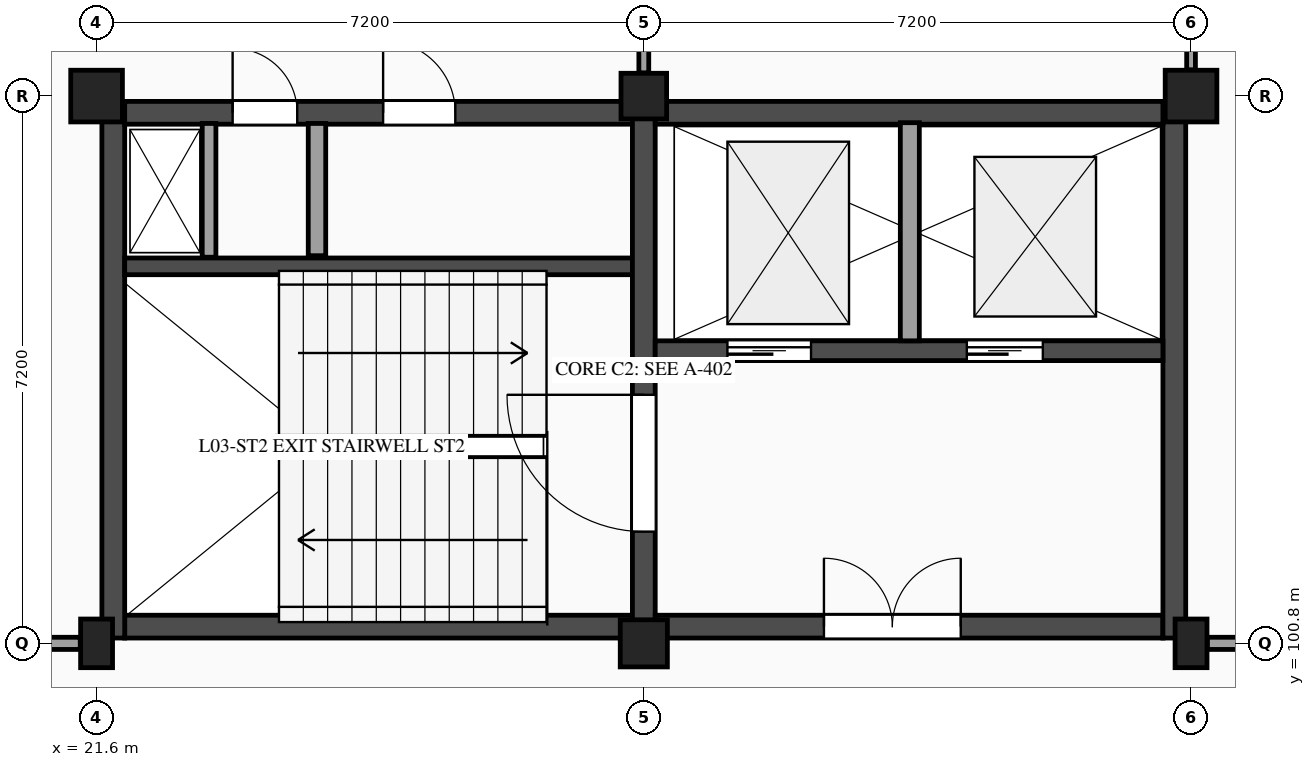
"""IFC4 building model, lengths in metres.
Left out: names, types, materials, properties, quantities, classifications, styles, units other than length and angle.
Written with IfcOpenShell. Run it as: python <this file> out.ifc"""

import sys

from ifc_helpers import new_model, si_unit, direction, frame, frame_2d, origin, origin_2d, place, context, subcontext, project, spatial, rectangle, extrude, element, fill, save


model = new_model("IFC4")
c1 = context("Model", 3, precision=1e-05, world=origin(), true_north=direction((0.0, 1.0)))
c2 = subcontext(c1, "Body", "Model", "MODEL_VIEW")
j1 = project(units=[si_unit("LENGTHUNIT", "METRE"), si_unit("PLANEANGLEUNIT", "RADIAN")], contexts=[c1])
p1 = place(None, origin())
s1 = spatial("IfcSite", under=j1, at=p1, CompositionType="ELEMENT")
p2 = place(p1, origin())
s2 = spatial("IfcBuilding", under=s1, at=p2, CompositionType="ELEMENT")
p3 = place(p2, frame((0.0, 0.0, 14.4)))
s3 = spatial("IfcBuildingStorey", under=s2, at=p3, CompositionType="ELEMENT", Elevation=14.4)
p4 = place(p3, frame((21.6, 100.8, 0.0), z_axis=(0.0, 0.0, 1.0), x_axis=(1.0, 0.0, 0.0)))
e1 = element("IfcColumn", 1, at=p4, inside=s3, PredefinedType="PILASTER", context=c2, shape_type="SweptSolid", body=[
    extrude(rectangle(XDim=0.42, YDim=0.64, at=origin_2d()), origin(), (0.0, 0.0, 1.0), 4.2),
])
p5 = place(p3, frame((21.6, 108.0, 0.0), z_axis=(0.0, 0.0, 1.0), x_axis=(1.0, 0.0, 0.0)))
e2 = element("IfcColumn", 2, at=p5, inside=s3, PredefinedType="COLUMN", context=c2, shape_type="SweptSolid", body=[
    extrude(rectangle(XDim=0.68, YDim=0.68, at=origin_2d()), origin(), (0.0, 0.0, 1.0), 4.2),
])
p6 = place(p3, frame((28.8, 100.8, 0.0), z_axis=(0.0, 0.0, 1.0), x_axis=(1.0, 0.0, 0.0)))
e3 = element("IfcColumn", 3, at=p6, inside=s3, PredefinedType="COLUMN", context=c2, shape_type="SweptSolid", body=[
    extrude(rectangle(XDim=0.62, YDim=0.62, at=origin_2d()), origin(), (0.0, 0.0, 1.0), 4.2),
])
p7 = place(p3, frame((28.8, 108.0, 0.0), z_axis=(0.0, 0.0, 1.0), x_axis=(1.0, 0.0, 0.0)))
e4 = element("IfcColumn", 4, at=p7, inside=s3, PredefinedType="COLUMN", context=c2, shape_type="SweptSolid", body=[
    extrude(rectangle(XDim=0.6, YDim=0.6, at=origin_2d()), origin(), (0.0, 0.0, 1.0), 4.2),
])
p8 = place(p3, frame((36.0, 100.8, 0.0), z_axis=(0.0, 0.0, 1.0), x_axis=(1.0, 0.0, 0.0)))
e5 = element("IfcColumn", 5, at=p8, inside=s3, PredefinedType="PILASTER", context=c2, shape_type="SweptSolid", body=[
    extrude(rectangle(XDim=0.42, YDim=0.64, at=origin_2d()), origin(), (0.0, 0.0, 1.0), 4.2),
])
p9 = place(p3, frame((36.0, 108.0, 0.0), z_axis=(0.0, 0.0, 1.0), x_axis=(1.0, 0.0, 0.0)))
e6 = element("IfcColumn", 6, at=p9, inside=s3, PredefinedType="COLUMN", context=c2, shape_type="SweptSolid", body=[
    extrude(rectangle(XDim=0.68, YDim=0.68, at=origin_2d()), origin(), (0.0, 0.0, 1.0), 4.2),
])
p10 = place(p3, frame((21.97, 101.02, 0.0), z_axis=(0.0, 0.0, 1.0), x_axis=(1.0, 0.0, 0.0)))
e7 = element("IfcWall", 7, at=p10, inside=s3, PredefinedType="SHEAR", context=c2, shape_type="SweptSolid", body=[
    extrude(rectangle(XDim=6.68, YDim=0.3, at=frame_2d((3.34, 0.0))), origin(), (0.0, 0.0, 1.0), 3.94),
])
p11 = place(p3, frame((21.82, 107.93, 0.0), z_axis=(0.0, 0.0, 1.0), x_axis=(0.0, -1.0, 0.0)))
e8 = element("IfcWall", 8, at=p11, inside=s3, PredefinedType="SHEAR", context=c2, shape_type="SweptSolid", body=[
    extrude(rectangle(XDim=7.06, YDim=0.3, at=frame_2d((3.53, 0.0))), origin(), (0.0, 0.0, 1.0), 3.94),
])
p12 = place(p3, frame((21.97, 107.78, 0.0), z_axis=(0.0, 0.0, 1.0), x_axis=(1.0, 0.0, 0.0)))
e9 = element("IfcWall", 9, at=p12, inside=s3, PredefinedType="SHEAR", context=c2, shape_type="SweptSolid", body=[
    extrude(rectangle(XDim=6.68, YDim=0.3, at=frame_2d((3.34, 0.0))), origin(), (0.0, 0.0, 1.0), 3.94),
])
p13 = place(p12, frame((1.42, 0.0, 0.0)))
e10 = element("IfcOpeningElement", 10, at=p13, cuts=e9, PredefinedType="OPENING", context=c2, shape_type="SweptSolid", body=[
    extrude(rectangle(XDim=0.85, YDim=2.1, at=frame_2d((0.425, 1.05))), frame((0.0, 0.16, 0.0), z_axis=(0.0, -1.0, 0.0), x_axis=(1.0, 0.0, 0.0)), (0.0, 0.0, 1.0), 0.32),
])
p14 = place(p12, frame((3.4, 0.0, 0.0)))
e11 = element("IfcOpeningElement", 11, at=p14, cuts=e9, PredefinedType="OPENING", context=c2, shape_type="SweptSolid", body=[
    extrude(rectangle(XDim=0.95, YDim=2.15, at=frame_2d((0.475, 1.075))), frame((0.0, 0.16, 0.0), z_axis=(0.0, -1.0, 0.0), x_axis=(1.0, 0.0, 0.0)), (0.0, 0.0, 1.0), 0.32),
])
p15 = place(p3, frame((21.97, 105.76, 0.0), z_axis=(0.0, 0.0, 1.0), x_axis=(1.0, 0.0, 0.0)))
e12 = element("IfcWall", 12, at=p15, inside=s3, PredefinedType="SHEAR", context=c2, shape_type="SweptSolid", body=[
    extrude(rectangle(XDim=6.68, YDim=0.22, at=frame_2d((3.34, 0.0))), origin(), (0.0, 0.0, 1.0), 3.94),
])
p16 = place(p3, frame((24.5, 105.9, 0.0), z_axis=(0.0, 0.0, 1.0), x_axis=(0.0, 1.0, 0.0)))
e13 = element("IfcWall", 13, at=p16, inside=s3, PredefinedType="PARTITIONING", context=c2, shape_type="SweptSolid", body=[
    extrude(rectangle(XDim=1.74, YDim=0.23, at=frame_2d((0.87, 0.0))), origin(), (0.0, 0.0, 1.0), 3.94),
])
p17 = place(p3, frame((23.08, 105.88, 0.0), z_axis=(0.0, 0.0, 1.0), x_axis=(0.0, 1.0, 0.0)))
e14 = element("IfcWall", 14, at=p17, inside=s3, PredefinedType="PARTITIONING", context=c2, shape_type="SweptSolid", body=[
    extrude(rectangle(XDim=1.76, YDim=0.18, at=frame_2d((0.88, 0.0))), origin(), (0.0, 0.0, 1.0), 3.94),
])
p18 = place(p3, frame((28.8, 100.87, 0.0), z_axis=(0.0, 0.0, 1.0), x_axis=(0.0, 1.0, 0.0)))
e15 = element("IfcWall", 15, at=p18, inside=s3, PredefinedType="SHEAR", context=c2, shape_type="SweptSolid", body=[
    extrude(rectangle(XDim=7.06, YDim=0.3, at=frame_2d((3.53, 0.0))), origin(), (0.0, 0.0, 1.0), 3.94),
])
p19 = place(p18, frame((1.4, 0.0, 0.0)))
e16 = element("IfcOpeningElement", 16, at=p19, cuts=e15, PredefinedType="OPENING", context=c2, shape_type="SweptSolid", body=[
    extrude(rectangle(XDim=1.8, YDim=2.2, at=frame_2d((0.9, 1.1))), frame((0.0, 0.16, 0.0), z_axis=(0.0, -1.0, 0.0), x_axis=(1.0, 0.0, 0.0)), (0.0, 0.0, 1.0), 0.32),
])
p20 = place(p3, frame((28.95, 101.02, 0.0), z_axis=(0.0, 0.0, 1.0), x_axis=(1.0, 0.0, 0.0)))
e17 = element("IfcWall", 17, at=p20, inside=s3, PredefinedType="SHEAR", context=c2, shape_type="SweptSolid", body=[
    extrude(rectangle(XDim=6.68, YDim=0.3, at=frame_2d((3.34, 0.0))), origin(), (0.0, 0.0, 1.0), 3.94),
])
p21 = place(p20, frame((2.22, 0.0, 0.0)))
e18 = element("IfcOpeningElement", 18, at=p21, cuts=e17, PredefinedType="OPENING", context=c2, shape_type="SweptSolid", body=[
    extrude(rectangle(XDim=1.8, YDim=2.2, at=frame_2d((0.9, 1.1))), frame((0.0, 0.16, 0.0), z_axis=(0.0, -1.0, 0.0), x_axis=(1.0, 0.0, 0.0)), (0.0, 0.0, 1.0), 0.32),
])
p22 = place(p3, frame((35.78, 100.87, 0.0), z_axis=(0.0, 0.0, 1.0), x_axis=(0.0, 1.0, 0.0)))
e19 = element("IfcWall", 19, at=p22, inside=s3, PredefinedType="SHEAR", context=c2, shape_type="SweptSolid", body=[
    extrude(rectangle(XDim=7.06, YDim=0.3, at=frame_2d((3.53, 0.0))), origin(), (0.0, 0.0, 1.0), 3.94),
])
p23 = place(p3, frame((28.95, 107.78, 0.0), z_axis=(0.0, 0.0, 1.0), x_axis=(1.0, 0.0, 0.0)))
e20 = element("IfcWall", 20, at=p23, inside=s3, PredefinedType="SHEAR", context=c2, shape_type="SweptSolid", body=[
    extrude(rectangle(XDim=6.68, YDim=0.3, at=frame_2d((3.34, 0.0))), origin(), (0.0, 0.0, 1.0), 3.94),
])
p24 = place(p3, frame((28.95, 104.65, 0.0), z_axis=(0.0, 0.0, 1.0), x_axis=(1.0, 0.0, 0.0)))
e21 = element("IfcWall", 21, at=p24, inside=s3, PredefinedType="SHEAR", context=c2, shape_type="SweptSolid", body=[
    extrude(rectangle(XDim=6.68, YDim=0.26, at=frame_2d((3.34, 0.0))), origin(), (0.0, 0.0, 1.0), 3.94),
])
p25 = place(p24, frame((0.95, 0.0, 0.0)))
e22 = element("IfcOpeningElement", 22, at=p25, cuts=e21, PredefinedType="OPENING", context=c2, shape_type="SweptSolid", body=[
    extrude(rectangle(XDim=1.1, YDim=2.2, at=frame_2d((0.55, 1.1))), frame((0.0, 0.14, 0.0), z_axis=(0.0, -1.0, 0.0), x_axis=(1.0, 0.0, 0.0)), (0.0, 0.0, 1.0), 0.28),
])
p26 = place(p24, frame((4.1, 0.0, 0.0)))
e23 = element("IfcOpeningElement", 23, at=p26, cuts=e21, PredefinedType="OPENING", context=c2, shape_type="SweptSolid", body=[
    extrude(rectangle(XDim=1.0, YDim=2.15, at=frame_2d((0.5, 1.075))), frame((0.0, 0.14, 0.0), z_axis=(0.0, -1.0, 0.0), x_axis=(1.0, 0.0, 0.0)), (0.0, 0.0, 1.0), 0.28),
])
p27 = place(p3, frame((32.3, 104.78, 0.0), z_axis=(0.0, 0.0, 1.0), x_axis=(0.0, 1.0, 0.0)))
e24 = element("IfcWall", 24, at=p27, inside=s3, PredefinedType="PARTITIONING", context=c2, shape_type="SweptSolid", body=[
    extrude(rectangle(XDim=2.87, YDim=0.25, at=frame_2d((1.435, 0.0))), origin(), (0.0, 0.0, 1.0), 3.94),
])
p28 = place(p3, frame((14.715, 100.8, 0.0), z_axis=(0.0, 0.0, 1.0), x_axis=(1.0, 0.0, 0.0)))
e25 = element("IfcWall", 25, at=p28, inside=s3, PredefinedType="PARTITIONING", context=c2, shape_type="SweptSolid", body=[
    extrude(rectangle(XDim=6.67, YDim=0.16, at=frame_2d((3.335, 0.0))), origin(), (0.0, 0.0, 1.0), 3.24),
])
p29 = place(p3, frame((28.8, 108.305, 0.0), z_axis=(0.0, 0.0, 1.0), x_axis=(0.0, 1.0, 0.0)))
e26 = element("IfcWall", 26, at=p29, inside=s3, PredefinedType="PARTITIONING", context=c2, shape_type="SweptSolid", body=[
    extrude(rectangle(XDim=6.515, YDim=0.13, at=frame_2d((3.258, 0.0))), origin(), (0.0, 0.0, 1.0), 3.245),
])
p30 = place(p3, frame((36.0, 108.345, 0.0), z_axis=(0.0, 0.0, 1.0), x_axis=(0.0, 1.0, 0.0)))
e27 = element("IfcWall", 27, at=p30, inside=s3, PredefinedType="PARTITIONING", context=c2, shape_type="SweptSolid", body=[
    extrude(rectangle(XDim=6.525, YDim=0.115, at=frame_2d((3.263, 0.0))), origin(), (0.0, 0.0, 1.0), 3.245),
])
p31 = place(p3, frame((36.215, 100.8, 0.0), z_axis=(0.0, 0.0, 1.0), x_axis=(1.0, 0.0, 0.0)))
e28 = element("IfcWall", 28, at=p31, inside=s3, PredefinedType="PARTITIONING", context=c2, shape_type="SweptSolid", body=[
    extrude(rectangle(XDim=6.67, YDim=0.16, at=frame_2d((3.335, 0.0))), origin(), (0.0, 0.0, 1.0), 3.3),
])
p32 = place(p31, frame((2.535, 0.0, 0.0)))
e29 = element("IfcOpeningElement", 29, at=p32, cuts=e28, PredefinedType="OPENING", context=c2, shape_type="SweptSolid", body=[
    extrude(rectangle(XDim=1.6, YDim=2.2, at=frame_2d((0.8, 1.1))), frame((0.0, 0.09, 0.0), z_axis=(0.0, -1.0, 0.0), x_axis=(1.0, 0.0, 0.0)), (0.0, 0.0, 1.0), 0.18),
])
p33 = place(p13, origin())
e30 = element("IfcDoor", 30, at=p33, inside=s3, OperationType="SINGLE_SWING_LEFT", PredefinedType="DOOR", context=c2, shape_type="SweptSolid", body=[
    extrude(rectangle(XDim=0.85, YDim=2.1, at=frame_2d((0.425, 1.05))), frame((0.0, 0.025, 0.0), z_axis=(0.0, -1.0, 0.0), x_axis=(1.0, 0.0, 0.0)), (0.0, 0.0, 1.0), 0.05),
])
fill(e10, e30)
p34 = place(p19, origin())
e31 = element("IfcDoor", 31, at=p34, inside=s3, OperationType="SINGLE_SWING_RIGHT", PredefinedType="DOOR", context=c2, shape_type="SweptSolid", body=[
    extrude(rectangle(XDim=1.8, YDim=2.2, at=frame_2d((0.9, 1.1))), frame((0.0, 0.025, 0.0), z_axis=(0.0, -1.0, 0.0), x_axis=(1.0, 0.0, 0.0)), (0.0, 0.0, 1.0), 0.05),
])
fill(e16, e31)
p35 = place(p14, origin())
e32 = element("IfcDoor", 32, at=p35, inside=s3, OperationType="SINGLE_SWING_LEFT", PredefinedType="DOOR", context=c2, shape_type="SweptSolid", body=[
    extrude(rectangle(XDim=0.95, YDim=2.15, at=frame_2d((0.475, 1.075))), frame((0.0, 0.025, 0.0), z_axis=(0.0, -1.0, 0.0), x_axis=(1.0, 0.0, 0.0)), (0.0, 0.0, 1.0), 0.05),
])
fill(e11, e32)
p36 = place(p25, origin())
e33 = element("IfcDoor", 33, at=p36, inside=s3, OperationType="SLIDING_TO_LEFT", PredefinedType="DOOR", context=c2, shape_type="SweptSolid", body=[
    extrude(rectangle(XDim=1.1, YDim=2.2, at=frame_2d((0.55, 1.1))), frame((0.0, 0.025, 0.0), z_axis=(0.0, -1.0, 0.0), x_axis=(1.0, 0.0, 0.0)), (0.0, 0.0, 1.0), 0.05),
])
fill(e22, e33)
p37 = place(p26, origin())
e34 = element("IfcDoor", 34, at=p37, inside=s3, OperationType="SLIDING_TO_RIGHT", PredefinedType="DOOR", context=c2, shape_type="SweptSolid", body=[
    extrude(rectangle(XDim=1.0, YDim=2.15, at=frame_2d((0.5, 1.075))), frame((0.0, 0.025, 0.0), z_axis=(0.0, -1.0, 0.0), x_axis=(1.0, 0.0, 0.0)), (0.0, 0.0, 1.0), 0.05),
])
fill(e23, e34)
p38 = place(p21, origin())
e35 = element("IfcDoor", 35, at=p38, inside=s3, OperationType="DOUBLE_DOOR_SINGLE_SWING", PredefinedType="DOOR", context=c2, shape_type="SweptSolid", body=[
    extrude(rectangle(XDim=1.8, YDim=2.2, at=frame_2d((0.9, 1.1))), frame((0.0, 0.025, 0.0), z_axis=(0.0, -1.0, 0.0), x_axis=(1.0, 0.0, 0.0)), (0.0, 0.0, 1.0), 0.05),
])
fill(e18, e35)
save(model, sys.argv[1])
